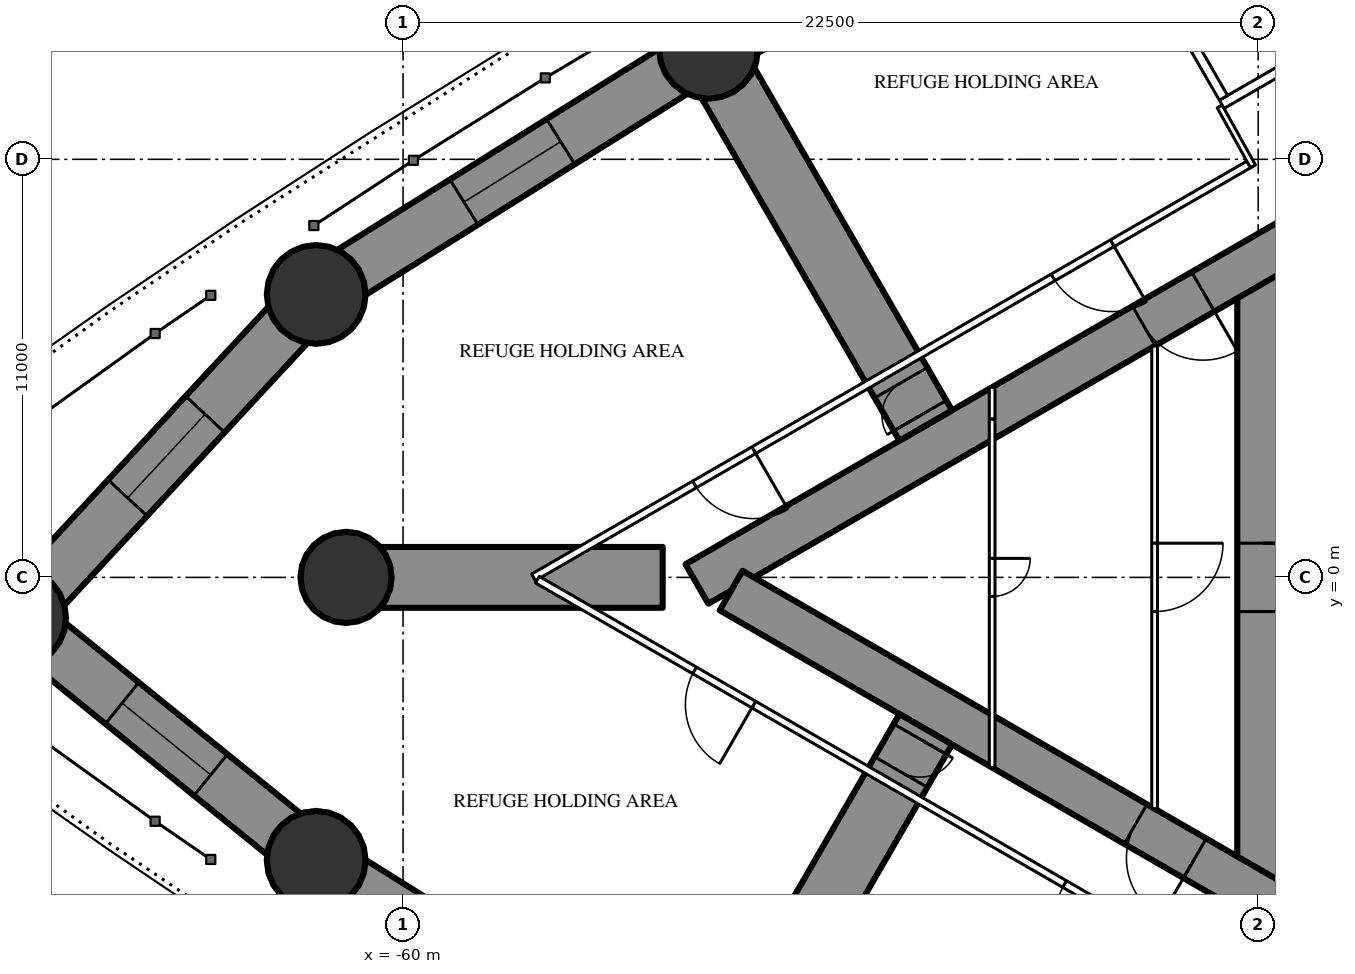
"""IFC4 building model, lengths in metres.
Left out: names, types, materials, properties, quantities, classifications, styles, units other than length and angle.
Written with IfcOpenShell. Run it as: python <this file> out.ifc"""

import sys

from ifc_helpers import new_model, si_unit, direction, frame, frame_2d, origin, origin_2d, place, context, subcontext, project, spatial, rectangle, circle, hollow_circle, extrude, element, fill, save


model = new_model("IFC4")
c1 = context("Model", 3, precision=1e-05, world=origin(), true_north=direction((0.0, 1.0)))
c2 = subcontext(c1, "Body", "Model", "MODEL_VIEW")
j1 = project(units=[si_unit("LENGTHUNIT", "METRE"), si_unit("PLANEANGLEUNIT", "RADIAN")], contexts=[c1])
p1 = place(None, origin())
s1 = spatial("IfcSite", under=j1, at=p1, CompositionType="ELEMENT")
p2 = place(p1, origin())
s2 = spatial("IfcBuilding", under=s1, at=p2, CompositionType="ELEMENT")
p3 = place(p2, frame((0.0, 0.0, 87.0)))
s3 = spatial("IfcBuildingStorey", under=s2, at=p3, CompositionType="ELEMENT", Elevation=87.0)
for number, where, z_axis, x_axis in (
    (1, (-70.168, -1.06, 0.0), (0.0, 0.0, 1.0), (1.0, 0.0, 0.0)),
    (2, (-62.287, -7.445, 0.0), (0.0, 0.0, 1.0), (1.0, 0.0, 0.0)),
    (3, (-51.963, 13.895, 0.0), (0.0, 0.0, 1.0), (1.0, 0.0, 0.0)),
    (4, (-62.287, 7.445, 0.0), (0.0, 0.0, 1.0), (1.0, 0.0, 0.0)),
):
    element("IfcColumn", number, at=place(p3, frame(where, z_axis=z_axis, x_axis=x_axis)), inside=s3, PredefinedType="COLUMN", context=c2, shape_type="SweptSolid", body=[
        extrude(hollow_circle(Radius=1.3, WallThickness=0.1, at=origin_2d()), origin(), (0.0, 0.0, 1.0), 3.6),
    ])
p4 = place(p3, frame((-61.5, 0.0, 0.0), z_axis=(0.0, 0.0, 1.0), x_axis=(1.0, 0.0, 0.0)))
e5 = element("IfcColumn", 5, at=p4, inside=s3, PredefinedType="COLUMN", context=c2, shape_type="SweptSolid", body=[
    extrude(circle(Radius=1.2, at=origin_2d()), origin(), (0.0, 0.0, 1.0), 3.6),
])
p5 = place(p3, frame((-37.375, 8.6, 0.0), z_axis=(0.0, 0.0, 1.0), x_axis=(0.0, -1.0, 0.0)))
e6 = element("IfcWall", 6, at=p5, inside=s3, PredefinedType="SHEAR", context=c2, shape_type="SweptSolid", body=[
    extrude(rectangle(XDim=17.2, YDim=1.35, at=frame_2d((8.6, 0.0))), origin(), (0.0, 0.0, 1.0), 3.6),
])
p6 = place(p5, frame((7.7, 0.0, 0.0)))
e7 = element("IfcOpeningElement", 7, at=p6, cuts=e6, PredefinedType="OPENING", context=c2, shape_type="SweptSolid", body=[
    extrude(rectangle(XDim=1.8, YDim=2.2, at=frame_2d((0.9, 1.1))), frame((0.0, 0.685, 0.0), z_axis=(0.0, -1.0, 0.0), x_axis=(1.0, 0.0, 0.0)), (0.0, 0.0, 1.0), 1.37),
])
p7 = place(p3, frame((-27.2, 14.3, 0.0), z_axis=(0.0, 0.0, 1.0), x_axis=(-0.866026593062, -0.499997940104, 0.0)))
e8 = element("IfcWall", 8, at=p7, inside=s3, PredefinedType="SHEAR", context=c2, shape_type="SweptSolid", body=[
    extrude(rectangle(XDim=28.946, YDim=1.2, at=frame_2d((14.473, 0.0))), origin(), (0.0, 0.0, 1.0), 3.6),
])
p8 = place(p7, frame((4.6, 0.0, 0.0)))
e9 = element("IfcOpeningElement", 9, at=p8, cuts=e8, PredefinedType="OPENING", context=c2, shape_type="SweptSolid", body=[
    extrude(rectangle(XDim=1.0, YDim=2.2, at=frame_2d((0.5, 1.1))), frame((0.0, 0.61, 0.0), z_axis=(0.0, -1.0, 0.0), x_axis=(1.0, 0.0, 0.0)), (0.0, 0.0, 1.0), 1.22),
])
p9 = place(p7, frame((13.568, 0.0, 0.0)))
e10 = element("IfcOpeningElement", 10, at=p9, cuts=e8, PredefinedType="OPENING", context=c2, shape_type="SweptSolid", body=[
    extrude(rectangle(XDim=1.8, YDim=2.03, at=frame_2d((0.9, 1.015))), frame((0.0, 0.61, 0.0), z_axis=(0.0, -1.0, 0.0), x_axis=(1.0, 0.0, 0.0)), (0.0, 0.0, 1.0), 1.22),
])
p10 = place(p3, frame((-27.2, -14.3, 0.0), z_axis=(0.0, 0.0, 1.0), x_axis=(-0.866024021859, 0.500002393557, 0.0)))
e11 = element("IfcWall", 11, at=p10, inside=s3, PredefinedType="SHEAR", context=c2, shape_type="SweptSolid", body=[
    extrude(rectangle(XDim=27.907, YDim=1.2, at=frame_2d((13.954, 0.0))), origin(), (0.0, 0.0, 1.0), 3.6),
])
p11 = place(p10, frame((4.6, 0.0, 0.0)))
e12 = element("IfcOpeningElement", 12, at=p11, cuts=e11, PredefinedType="OPENING", context=c2, shape_type="SweptSolid", body=[
    extrude(rectangle(XDim=1.0, YDim=2.2, at=frame_2d((0.5, 1.1))), frame((0.0, 0.61, 0.0), z_axis=(0.0, -1.0, 0.0), x_axis=(1.0, 0.0, 0.0)), (0.0, 0.0, 1.0), 1.22),
])
p12 = place(p10, frame((13.818, 0.0, 0.0)))
e13 = element("IfcOpeningElement", 13, at=p12, cuts=e11, PredefinedType="OPENING", context=c2, shape_type="SweptSolid", body=[
    extrude(rectangle(XDim=1.8, YDim=2.2, at=frame_2d((0.9, 1.1))), frame((0.0, 0.61, 0.0), z_axis=(0.0, -1.0, 0.0), x_axis=(1.0, 0.0, 0.0)), (0.0, 0.0, 1.0), 1.22),
])
p13 = place(p3, frame((-46.248, 3.996, 0.0), z_axis=(0.0, 0.0, 1.0), x_axis=(-0.499993613132, 0.866029091213, 0.0)))
e14 = element("IfcWall", 14, at=p13, inside=s3, PredefinedType="SHEAR", context=c2, shape_type="SweptSolid", body=[
    extrude(rectangle(XDim=11.431, YDim=1.6, at=frame_2d((5.715, 0.0))), origin(), (0.0, 0.0, 1.0), 3.6),
])
p14 = place(p13, frame((0.3, 0.0, 0.0)))
e15 = element("IfcOpeningElement", 15, at=p14, cuts=e14, PredefinedType="OPENING", context=c2, shape_type="SweptSolid", body=[
    extrude(rectangle(XDim=1.0, YDim=2.2, at=frame_2d((0.5, 1.1))), frame((0.0, 0.81, 0.0), z_axis=(0.0, -1.0, 0.0), x_axis=(1.0, 0.0, 0.0)), (0.0, 0.0, 1.0), 1.62),
])
p15 = place(p3, frame((-53.168, 0.0, 0.0), z_axis=(0.0, 0.0, 1.0), x_axis=(-1.0, 0.0, 0.0)))
e16 = element("IfcWall", 16, at=p15, inside=s3, PredefinedType="SHEAR", context=c2, shape_type="SweptSolid", body=[
    extrude(rectangle(XDim=8.332, YDim=1.6, at=frame_2d((4.166, 0.0))), origin(), (0.0, 0.0, 1.0), 3.6),
])
p16 = place(p3, frame((-46.248, -3.996, 0.0), z_axis=(0.0, 0.0, 1.0), x_axis=(-0.499993613132, -0.866029091213, 0.0)))
e17 = element("IfcWall", 17, at=p16, inside=s3, PredefinedType="SHEAR", context=c2, shape_type="SweptSolid", body=[
    extrude(rectangle(XDim=11.431, YDim=1.6, at=frame_2d((5.715, 0.0))), origin(), (0.0, 0.0, 1.0), 3.6),
])
p17 = place(p16, frame((0.3, 0.0, 0.0)))
e18 = element("IfcOpeningElement", 18, at=p17, cuts=e17, PredefinedType="OPENING", context=c2, shape_type="SweptSolid", body=[
    extrude(rectangle(XDim=1.0, YDim=2.2, at=frame_2d((0.5, 1.1))), frame((0.0, 0.81, 0.0), z_axis=(0.0, -1.0, 0.0), x_axis=(1.0, 0.0, 0.0)), (0.0, 0.0, 1.0), 1.62),
])
p18 = place(p3, frame((-41.245, 19.666, 0.0), z_axis=(0.0, 0.0, 1.0), x_axis=(-0.880492350889, -0.474060354835, 0.0)))
e19 = element("IfcWall", 19, at=p18, inside=s3, PredefinedType="SHEAR", context=c2, shape_type="SweptSolid", body=[
    extrude(rectangle(XDim=12.173, YDim=1.4, at=frame_2d((6.086, 0.0))), origin(), (0.0, 0.0, 1.0), 3.6),
])
p19 = place(p18, frame((4.586, 0.0, 0.6)))
e20 = element("IfcOpeningElement", 20, at=p19, cuts=e19, PredefinedType="OPENING", context=c2, shape_type="SweptSolid", body=[
    extrude(rectangle(XDim=3.0, YDim=1.2, at=frame_2d((1.5, 0.6))), frame((0.0, 0.71, 0.0), z_axis=(0.0, -1.0, 0.0), x_axis=(1.0, 0.0, 0.0)), (0.0, 0.0, 1.0), 1.42),
])
p20 = place(p3, frame((-51.963, 13.895, 0.0), z_axis=(0.0, 0.0, 1.0), x_axis=(-0.848062521637, -0.529896177939, 0.0)))
e21 = element("IfcWall", 21, at=p20, inside=s3, PredefinedType="SHEAR", context=c2, shape_type="SweptSolid", body=[
    extrude(rectangle(XDim=12.173, YDim=1.4, at=frame_2d((6.086, 0.0))), origin(), (0.0, 0.0, 1.0), 3.6),
])
p21 = place(p20, frame((4.586, 0.0, 0.6)))
e22 = element("IfcOpeningElement", 22, at=p21, cuts=e21, PredefinedType="OPENING", context=c2, shape_type="SweptSolid", body=[
    extrude(rectangle(XDim=3.0, YDim=1.2, at=frame_2d((1.5, 0.6))), frame((0.0, 0.71, 0.0), z_axis=(0.0, -1.0, 0.0), x_axis=(1.0, 0.0, 0.0)), (0.0, 0.0, 1.0), 1.42),
])
p22 = place(p3, frame((-62.287, 7.445, 0.0), z_axis=(0.0, 0.0, 1.0), x_axis=(-0.679718253794, -0.733473309303, 0.0)))
e23 = element("IfcWall", 23, at=p22, inside=s3, PredefinedType="SHEAR", context=c2, shape_type="SweptSolid", body=[
    extrude(rectangle(XDim=11.595, YDim=1.4, at=frame_2d((5.797, 0.0))), origin(), (0.0, 0.0, 1.0), 3.6),
])
p23 = place(p22, frame((4.298, 0.0, 0.6)))
e24 = element("IfcOpeningElement", 24, at=p23, cuts=e23, PredefinedType="OPENING", context=c2, shape_type="SweptSolid", body=[
    extrude(rectangle(XDim=3.0, YDim=1.2, at=frame_2d((1.5, 0.6))), frame((0.0, 0.71, 0.0), z_axis=(0.0, -1.0, 0.0), x_axis=(1.0, 0.0, 0.0)), (0.0, 0.0, 1.0), 1.42),
])
p24 = place(p3, frame((-70.168, -1.06, 0.0), z_axis=(0.0, 0.0, 1.0), x_axis=(0.777033503891, -0.629459239213, 0.0)))
e25 = element("IfcWall", 25, at=p24, inside=s3, PredefinedType="SHEAR", context=c2, shape_type="SweptSolid", body=[
    extrude(rectangle(XDim=10.143, YDim=1.4, at=frame_2d((5.071, 0.0))), origin(), (0.0, 0.0, 1.0), 3.6),
])
p25 = place(p24, frame((3.572, 0.0, 0.6)))
e26 = element("IfcOpeningElement", 26, at=p25, cuts=e25, PredefinedType="OPENING", context=c2, shape_type="SweptSolid", body=[
    extrude(rectangle(XDim=3.0, YDim=1.2, at=frame_2d((1.5, 0.6))), frame((0.0, 0.71, 0.0), z_axis=(0.0, -1.0, 0.0), x_axis=(1.0, 0.0, 0.0)), (0.0, 0.0, 1.0), 1.42),
])
p26 = place(p3, frame((-62.287, -7.445, 0.0), z_axis=(0.0, 0.0, 1.0), x_axis=(0.848062521637, -0.529896177939, 0.0)))
e27 = element("IfcWall", 27, at=p26, inside=s3, PredefinedType="SHEAR", context=c2, shape_type="SweptSolid", body=[
    extrude(rectangle(XDim=12.173, YDim=1.4, at=frame_2d((6.086, 0.0))), origin(), (0.0, 0.0, 1.0), 3.6),
])
p27 = place(p26, frame((4.586, 0.0, 0.6)))
e28 = element("IfcOpeningElement", 28, at=p27, cuts=e27, PredefinedType="OPENING", context=c2, shape_type="SweptSolid", body=[
    extrude(rectangle(XDim=3.0, YDim=1.2, at=frame_2d((1.5, 0.6))), frame((0.0, 0.71, 0.0), z_axis=(0.0, -1.0, 0.0), x_axis=(1.0, 0.0, 0.0)), (0.0, 0.0, 1.0), 1.42),
])
p28 = place(p3, frame((-37.7, 10.894, 0.0), z_axis=(0.0, 0.0, 1.0), x_axis=(-0.866027905338, -0.499995667157, 0.0)))
e29 = element("IfcWall", 29, at=p28, inside=s3, PredefinedType="PARTITIONING", context=c2, shape_type="SweptSolid", body=[
    extrude(rectangle(XDim=21.787, YDim=0.2, at=frame_2d((10.894, 0.0))), origin(), (0.0, 0.0, 1.0), 3.35),
])
p29 = place(p28, frame((15.094, 0.0, 0.0)))
e30 = element("IfcOpeningElement", 30, at=p29, cuts=e29, PredefinedType="OPENING", context=c2, shape_type="SweptSolid", body=[
    extrude(rectangle(XDim=1.8, YDim=2.2, at=frame_2d((0.9, 1.1))), frame((0.0, 0.11, 0.0), z_axis=(0.0, -1.0, 0.0), x_axis=(1.0, 0.0, 0.0)), (0.0, 0.0, 1.0), 0.22),
])
p30 = place(p28, frame((4.201, 0.0, 0.0)))
e31 = element("IfcOpeningElement", 31, at=p30, cuts=e29, PredefinedType="OPENING", context=c2, shape_type="SweptSolid", body=[
    extrude(rectangle(XDim=1.8, YDim=2.2, at=frame_2d((0.9, 1.1))), frame((0.0, 0.11, 0.0), z_axis=(0.0, -1.0, 0.0), x_axis=(1.0, 0.0, 0.0)), (0.0, 0.0, 1.0), 0.22),
])
p31 = place(p3, frame((-36.92, -11.344, 0.0), z_axis=(0.0, 0.0, 1.0), x_axis=(-0.866028313256, 0.499994960614, 0.0)))
e32 = element("IfcWall", 32, at=p31, inside=s3, PredefinedType="PARTITIONING", context=c2, shape_type="SweptSolid", body=[
    extrude(rectangle(XDim=22.568, YDim=0.2, at=frame_2d((11.284, 0.0))), origin(), (0.0, 0.0, 1.0), 3.35),
])
p32 = place(p31, frame((15.994, 0.0, 0.0)))
e33 = element("IfcOpeningElement", 33, at=p32, cuts=e32, PredefinedType="OPENING", context=c2, shape_type="SweptSolid", body=[
    extrude(rectangle(XDim=1.8, YDim=2.2, at=frame_2d((0.9, 1.1))), frame((0.0, 0.11, 0.0), z_axis=(0.0, -1.0, 0.0), x_axis=(1.0, 0.0, 0.0)), (0.0, 0.0, 1.0), 0.22),
])
p33 = place(p31, frame((4.551, 0.0, 0.0)))
e34 = element("IfcOpeningElement", 34, at=p33, cuts=e32, PredefinedType="OPENING", context=c2, shape_type="SweptSolid", body=[
    extrude(rectangle(XDim=2.0, YDim=2.4, at=frame_2d((1.0, 1.2))), frame((0.0, 0.11, 0.0), z_axis=(0.0, -1.0, 0.0), x_axis=(1.0, 0.0, 0.0)), (0.0, 0.0, 1.0), 0.22),
])
p34 = place(p3, frame((-38.513, 12.392, 0.0), z_axis=(0.0, 0.0, 1.0), x_axis=(0.485585508183, -0.874189175317, 0.0)))
e35 = element("IfcWall", 35, at=p34, inside=s3, PredefinedType="PARTITIONING", context=c2, shape_type="SweptSolid", body=[
    extrude(rectangle(XDim=1.805, YDim=0.15, at=frame_2d((0.902, 0.0))), origin(), (0.0, 0.0, 1.0), 3.35),
])
p35 = place(p3, frame((-40.225, 6.087, 0.0), z_axis=(0.0, 0.0, 1.0), x_axis=(0.0, -1.0, 0.0)))
e36 = element("IfcWall", 36, at=p35, inside=s3, PredefinedType="PARTITIONING", context=c2, shape_type="SweptSolid", body=[
    extrude(rectangle(XDim=12.174, YDim=0.15, at=frame_2d((6.087, 0.0))), origin(), (0.0, 0.0, 1.0), 3.35),
])
p36 = place(p35, frame((5.187, 0.0, 0.0)))
e37 = element("IfcOpeningElement", 37, at=p36, cuts=e36, PredefinedType="OPENING", context=c2, shape_type="SweptSolid", body=[
    extrude(rectangle(XDim=1.8, YDim=2.2, at=frame_2d((0.9, 1.1))), frame((0.0, 0.085, 0.0), z_axis=(0.0, -1.0, 0.0), x_axis=(1.0, 0.0, 0.0)), (0.0, 0.0, 1.0), 0.17),
])
p37 = place(p3, frame((-44.5, 4.169, 0.0), z_axis=(0.0, 0.0, 1.0), x_axis=(0.0, -1.0, 0.0)))
e38 = element("IfcWall", 38, at=p37, inside=s3, PredefinedType="PARTITIONING", context=c2, shape_type="SweptSolid", body=[
    extrude(rectangle(XDim=9.173, YDim=0.15, at=frame_2d((4.587, 0.0))), origin(), (0.0, 0.0, 1.0), 3.35),
])
p38 = place(p37, frame((3.669, 0.0, 0.0)))
e39 = element("IfcOpeningElement", 39, at=p38, cuts=e38, PredefinedType="OPENING", context=c2, shape_type="SweptSolid", body=[
    extrude(rectangle(XDim=1.0, YDim=2.2, at=frame_2d((0.5, 1.1))), frame((0.0, 0.085, 0.0), z_axis=(0.0, -1.0, 0.0), x_axis=(1.0, 0.0, 0.0)), (0.0, 0.0, 1.0), 0.17),
])
p39 = place(p3, frame((-31.01, 16.747, 0.0), z_axis=(0.0, 0.0, 1.0), x_axis=(-0.866028165386, -0.499995216735, 0.0)))
e40 = element("IfcWall", 40, at=p39, inside=s3, PredefinedType="PARTITIONING", context=c2, shape_type="SweptSolid", body=[
    extrude(rectangle(XDim=8.6, YDim=0.25, at=frame_2d((4.3, 0.0))), origin(), (0.0, 0.0, 1.0), 3.35),
])
p40 = place(p3, frame((-38.413, 12.618, 0.0), z_axis=(0.0, 0.0, 1.0), x_axis=(-0.499872130319, 0.866099216793, 0.0)))
e41 = element("IfcWall", 41, at=p40, inside=s3, PredefinedType="PARTITIONING", context=c2, shape_type="SweptSolid", body=[
    extrude(rectangle(XDim=3.2, YDim=0.25, at=frame_2d((1.6, 0.0))), origin(), (0.0, 0.0, 1.0), 3.35),
])
p41 = place(p3, frame((-44.5, 5.005, 0.0), z_axis=(0.0, 0.0, 1.0), x_axis=(0.0, -1.0, 0.0)))
e42 = element("IfcWall", 42, at=p41, inside=s3, PredefinedType="PARTITIONING", context=c2, shape_type="SweptSolid", body=[
    extrude(rectangle(XDim=0.836, YDim=0.15, at=frame_2d((0.418, 0.0))), origin(), (0.0, 0.0, 1.0), 2.05),
])
p42 = place(p21, origin())
e43 = element("IfcWindow", 43, at=p42, inside=s3, PartitioningType="SINGLE_PANEL", PredefinedType="WINDOW", context=c2, shape_type="SweptSolid", body=[
    extrude(rectangle(XDim=3.0, YDim=1.2, at=frame_2d((1.5, 0.6))), frame((0.0, 0.03, 0.0), z_axis=(0.0, -1.0, 0.0), x_axis=(1.0, 0.0, 0.0)), (0.0, 0.0, 1.0), 0.06),
])
fill(e22, e43)
p43 = place(p23, origin())
e44 = element("IfcWindow", 44, at=p43, inside=s3, PartitioningType="SINGLE_PANEL", PredefinedType="WINDOW", context=c2, shape_type="SweptSolid", body=[
    extrude(rectangle(XDim=3.0, YDim=1.2, at=frame_2d((1.5, 0.6))), frame((0.0, 0.03, 0.0), z_axis=(0.0, -1.0, 0.0), x_axis=(1.0, 0.0, 0.0)), (0.0, 0.0, 1.0), 0.06),
])
fill(e24, e44)
p44 = place(p25, origin())
e45 = element("IfcWindow", 45, at=p44, inside=s3, PartitioningType="SINGLE_PANEL", PredefinedType="WINDOW", context=c2, shape_type="SweptSolid", body=[
    extrude(rectangle(XDim=3.0, YDim=1.2, at=frame_2d((1.5, 0.6))), frame((0.0, 0.03, 0.0), z_axis=(0.0, -1.0, 0.0), x_axis=(1.0, 0.0, 0.0)), (0.0, 0.0, 1.0), 0.06),
])
fill(e26, e45)
p45 = place(p14, origin())
e46 = element("IfcDoor", 46, at=p45, inside=s3, OperationType="SINGLE_SWING_LEFT", PredefinedType="DOOR", context=c2, shape_type="SweptSolid", body=[
    extrude(rectangle(XDim=1.0, YDim=2.2, at=frame_2d((0.5, 1.1))), frame((0.0, 0.025, 0.0), z_axis=(0.0, -1.0, 0.0), x_axis=(1.0, 0.0, 0.0)), (0.0, 0.0, 1.0), 0.05),
])
fill(e15, e46)
p46 = place(p17, origin())
e47 = element("IfcDoor", 47, at=p46, inside=s3, OperationType="SINGLE_SWING_LEFT", PredefinedType="DOOR", context=c2, shape_type="SweptSolid", body=[
    extrude(rectangle(XDim=1.0, YDim=2.2, at=frame_2d((0.5, 1.1))), frame((0.0, 0.025, 0.0), z_axis=(0.0, -1.0, 0.0), x_axis=(1.0, 0.0, 0.0)), (0.0, 0.0, 1.0), 0.05),
])
fill(e18, e47)
p47 = place(p29, origin())
e48 = element("IfcDoor", 48, at=p47, inside=s3, OperationType="DOUBLE_DOOR_SINGLE_SWING", PredefinedType="DOOR", context=c2, shape_type="SweptSolid", body=[
    extrude(rectangle(XDim=1.8, YDim=2.2, at=frame_2d((0.9, 1.1))), frame((0.0, 0.025, 0.0), z_axis=(0.0, -1.0, 0.0), x_axis=(1.0, 0.0, 0.0)), (0.0, 0.0, 1.0), 0.05),
])
fill(e30, e48)
p48 = place(p32, origin())
e49 = element("IfcDoor", 49, at=p48, inside=s3, OperationType="DOUBLE_DOOR_SINGLE_SWING", PredefinedType="DOOR", context=c2, shape_type="SweptSolid", body=[
    extrude(rectangle(XDim=1.8, YDim=2.2, at=frame_2d((0.9, 1.1))), frame((0.0, 0.025, 0.0), z_axis=(0.0, -1.0, 0.0), x_axis=(1.0, 0.0, 0.0)), (0.0, 0.0, 1.0), 0.05),
])
fill(e33, e49)
p49 = place(p30, origin())
e50 = element("IfcDoor", 50, at=p49, inside=s3, OperationType="DOUBLE_DOOR_SINGLE_SWING", PredefinedType="DOOR", context=c2, shape_type="SweptSolid", body=[
    extrude(rectangle(XDim=1.8, YDim=2.2, at=frame_2d((0.9, 1.1))), frame((0.0, 0.025, 0.0), z_axis=(0.0, -1.0, 0.0), x_axis=(1.0, 0.0, 0.0)), (0.0, 0.0, 1.0), 0.05),
])
fill(e31, e50)
p50 = place(p33, origin())
e51 = element("IfcDoor", 51, at=p50, inside=s3, OperationType="DOUBLE_DOOR_SINGLE_SWING", PredefinedType="DOOR", context=c2, shape_type="SweptSolid", body=[
    extrude(rectangle(XDim=2.0, YDim=2.4, at=frame_2d((1.0, 1.2))), frame((0.0, 0.025, 0.0), z_axis=(0.0, -1.0, 0.0), x_axis=(1.0, 0.0, 0.0)), (0.0, 0.0, 1.0), 0.05),
])
fill(e34, e51)
p51 = place(p36, origin())
e52 = element("IfcDoor", 52, at=p51, inside=s3, OperationType="DOUBLE_DOOR_SINGLE_SWING", PredefinedType="DOOR", context=c2, shape_type="SweptSolid", body=[
    extrude(rectangle(XDim=1.8, YDim=2.2, at=frame_2d((0.9, 1.1))), frame((0.0, 0.025, 0.0), z_axis=(0.0, -1.0, 0.0), x_axis=(1.0, 0.0, 0.0)), (0.0, 0.0, 1.0), 0.05),
])
fill(e37, e52)
p52 = place(p38, origin())
e53 = element("IfcDoor", 53, at=p52, inside=s3, OperationType="SINGLE_SWING_LEFT", PredefinedType="DOOR", context=c2, shape_type="SweptSolid", body=[
    extrude(rectangle(XDim=1.0, YDim=2.2, at=frame_2d((0.5, 1.1))), frame((0.0, 0.025, 0.0), z_axis=(0.0, -1.0, 0.0), x_axis=(1.0, 0.0, 0.0)), (0.0, 0.0, 1.0), 0.05),
])
fill(e39, e53)
p53 = place(p9, origin())
e54 = element("IfcDoor", 54, at=p53, inside=s3, OperationType="DOUBLE_DOOR_SINGLE_SWING", PredefinedType="DOOR", context=c2, shape_type="SweptSolid", body=[
    extrude(rectangle(XDim=1.8, YDim=2.03, at=frame_2d((0.9, 1.015))), frame((0.0, 0.025, 0.0), z_axis=(0.0, -1.0, 0.0), x_axis=(1.0, 0.0, 0.0)), (0.0, 0.0, 1.0), 0.05),
])
fill(e10, e54)
p54 = place(p12, origin())
e55 = element("IfcDoor", 55, at=p54, inside=s3, OperationType="DOUBLE_DOOR_SINGLE_SWING", PredefinedType="DOOR", context=c2, shape_type="SweptSolid", body=[
    extrude(rectangle(XDim=1.8, YDim=2.2, at=frame_2d((0.9, 1.1))), frame((0.0, 0.025, 0.0), z_axis=(0.0, -1.0, 0.0), x_axis=(1.0, 0.0, 0.0)), (0.0, 0.0, 1.0), 0.05),
])
fill(e13, e55)
p55 = place(p6, origin())
e56 = element("IfcDoor", 56, at=p55, inside=s3, OperationType="DOUBLE_DOOR_SINGLE_SWING", PredefinedType="DOOR", context=c2, shape_type="SweptSolid", body=[
    extrude(rectangle(XDim=1.8, YDim=2.2, at=frame_2d((0.9, 1.1))), frame((0.0, 0.025, 0.0), z_axis=(0.0, -1.0, 0.0), x_axis=(1.0, 0.0, 0.0)), (0.0, 0.0, 1.0), 0.05),
])
fill(e7, e56)
save(model, sys.argv[1])
